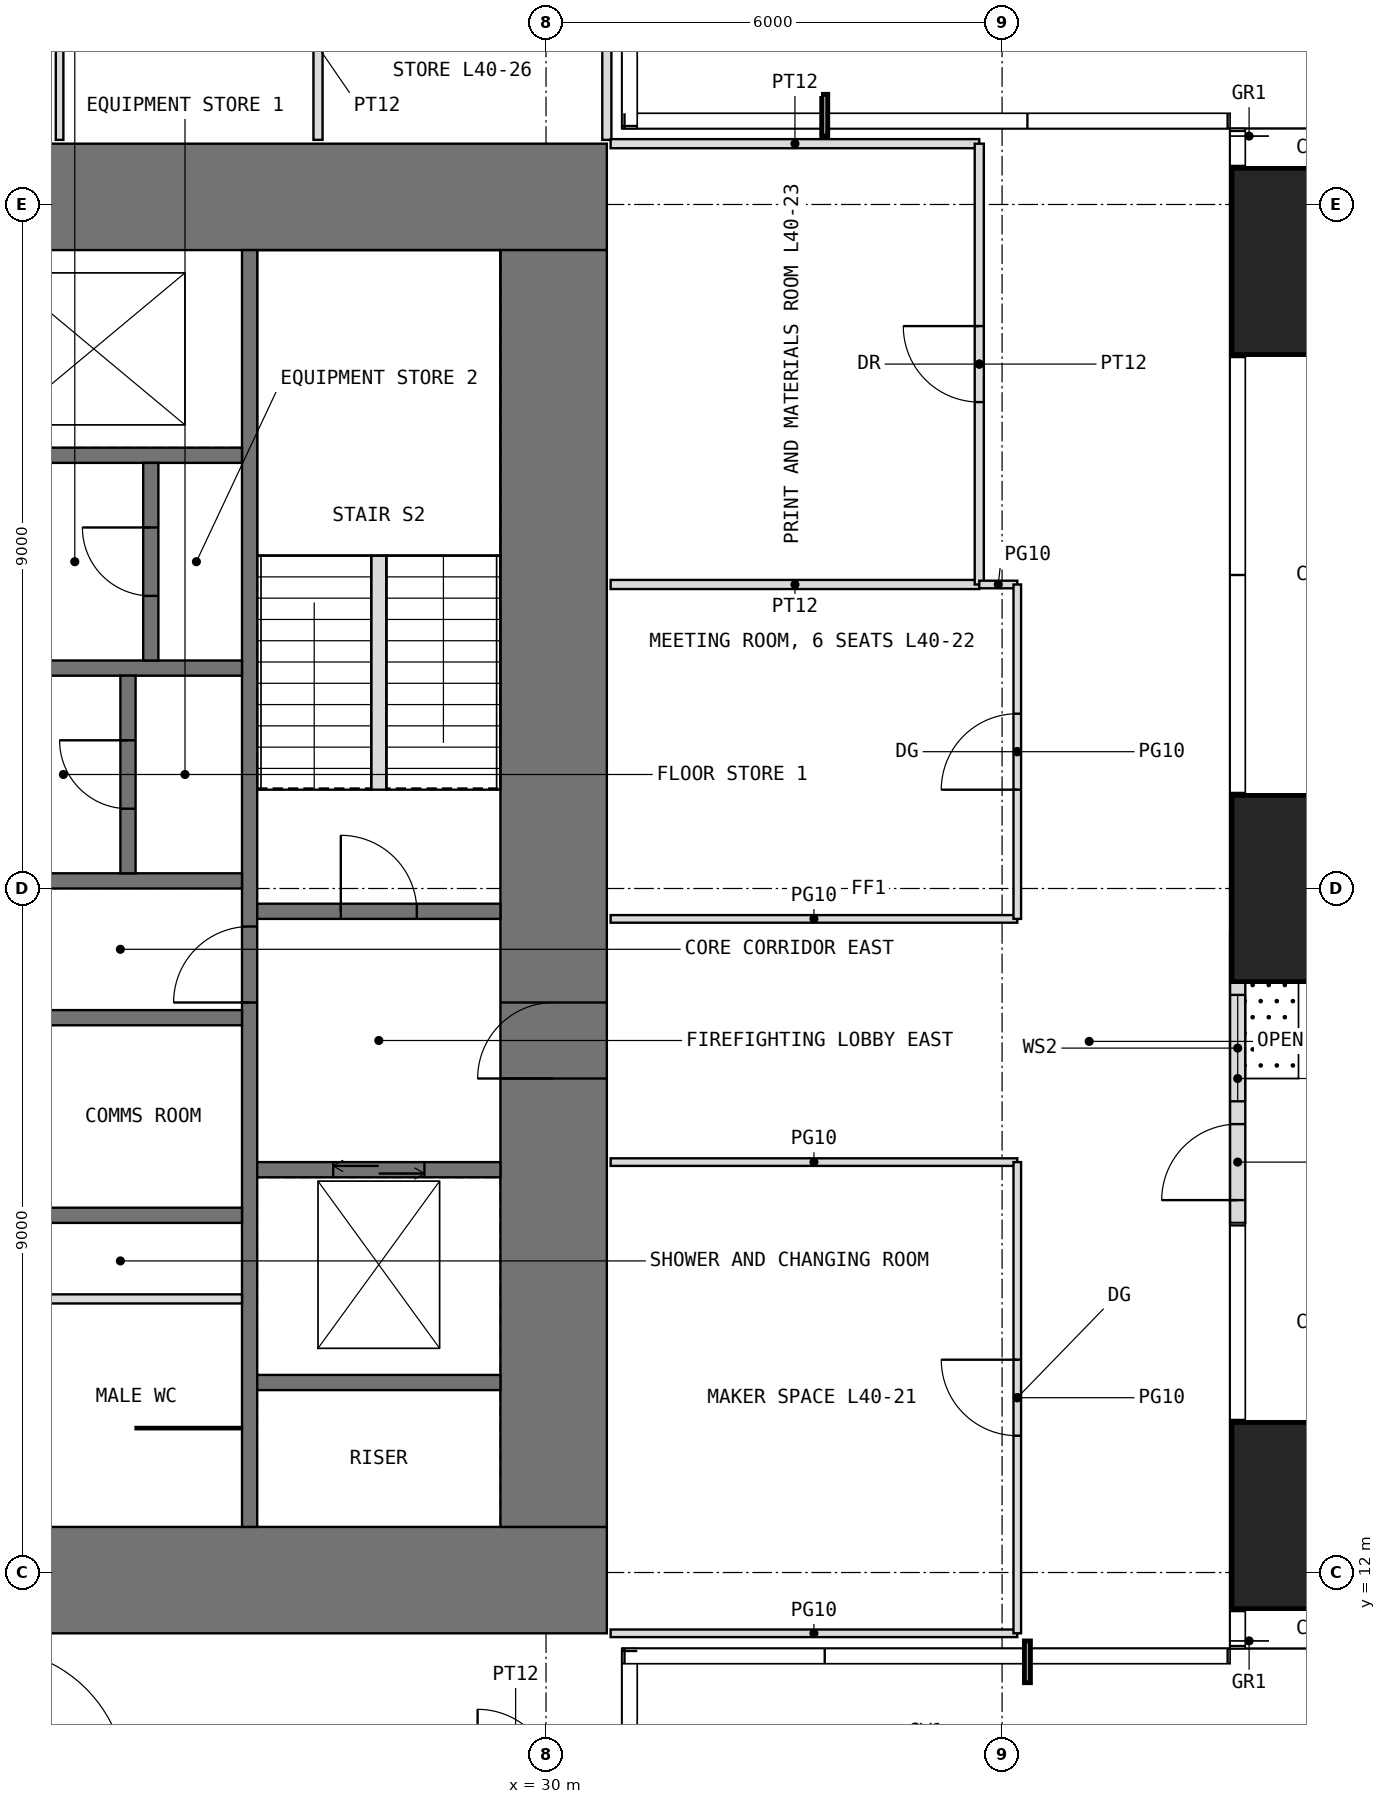
"""IFC4 building model, lengths in metres.
Left out: names, types, materials, properties, quantities, classifications, styles, units other than length and angle.
Written with IfcOpenShell. Run it as: python <this file> out.ifc"""

import sys

from ifc_helpers import new_model, si_unit, direction, frame, frame_2d, origin, origin_2d, place, context, subcontext, project, spatial, rectangle, extrude, element, fill, save


model = new_model("IFC4")
c1 = context("Model", 3, precision=1e-05, world=origin(), true_north=direction((0.0, 1.0)))
c2 = subcontext(c1, "Body", "Model", "MODEL_VIEW")
j1 = project(units=[si_unit("LENGTHUNIT", "METRE"), si_unit("PLANEANGLEUNIT", "RADIAN")], contexts=[c1])
p1 = place(None, origin())
s1 = spatial("IfcSite", under=j1, at=p1, CompositionType="ELEMENT")
p2 = place(p1, origin())
s2 = spatial("IfcBuilding", under=s1, at=p2, CompositionType="ELEMENT")
p3 = place(p2, frame((0.0, 0.0, 170.5)))
s3 = spatial("IfcBuildingStorey", under=s2, at=p3, CompositionType="ELEMENT", Elevation=170.5)
for number, where, z_axis, x_axis in (
    (1, (40.25, 12.75, 0.0), (0.0, 0.0, 1.0), (1.0, 0.0, 0.0)),
    (2, (40.25, 21.0, 0.0), (0.0, 0.0, 1.0), (1.0, 0.0, 0.0)),
    (3, (40.25, 29.25, 0.0), (0.0, 0.0, 1.0), (1.0, 0.0, 0.0)),
):
    element("IfcColumn", number, at=place(p3, frame(where, z_axis=z_axis, x_axis=x_axis)), inside=s3, PredefinedType="COLUMN", context=c2, shape_type="SweptSolid", body=[
        extrude(rectangle(XDim=2.45, YDim=2.45, at=origin_2d()), origin(), (0.0, 0.0, 1.0), 4.0),
    ])
p4 = place(p3, frame((39.1, 16.6, 0.0), z_axis=(0.0, 0.0, 1.0), x_axis=(0.0, 1.0, 0.0)))
e4 = element("IfcWall", 4, at=p4, inside=s3, PredefinedType="USERDEFINED", context=c2, shape_type="SweptSolid", body=[
    extrude(rectangle(XDim=3.8, YDim=0.2, at=frame_2d((1.9, 0.0))), origin(), (0.0, 0.0, 1.0), 3.75),
])
p5 = place(p4, frame((0.3, 0.0, 0.0)))
e5 = element("IfcOpeningElement", 5, at=p5, cuts=e4, PredefinedType="OPENING", context=c2, shape_type="SweptSolid", body=[
    extrude(rectangle(XDim=1.0, YDim=2.4, at=frame_2d((0.5, 1.2))), frame((0.0, 0.11, 0.0), z_axis=(0.0, -1.0, 0.0), x_axis=(1.0, 0.0, 0.0)), (0.0, 0.0, 1.0), 0.22),
])
p6 = place(p4, frame((1.6, 0.0, 0.3)))
e6 = element("IfcOpeningElement", 6, at=p6, cuts=e4, PredefinedType="OPENING", context=c2, shape_type="SweptSolid", body=[
    extrude(rectangle(XDim=1.4, YDim=2.7, at=frame_2d((0.7, 1.35))), frame((0.0, 0.11, 0.0), z_axis=(0.0, -1.0, 0.0), x_axis=(1.0, 0.0, 0.0)), (0.0, 0.0, 1.0), 0.22),
])
p7 = place(p3, frame((11.2, 11.9, -0.05), z_axis=(0.0, 0.0, 1.0), x_axis=(1.0, 0.0, 0.0)))
e7 = element("IfcWall", 7, at=p7, inside=s3, PredefinedType="SHEAR", context=c2, shape_type="SweptSolid", body=[
    extrude(rectangle(XDim=19.6, YDim=1.4, at=frame_2d((9.8, 0.0))), origin(), (0.0, 0.0, 1.0), 4.0),
])
p8 = place(p7, frame((8.8, 0.0, 0.05)))
e8 = element("IfcOpeningElement", 8, at=p8, cuts=e7, PredefinedType="OPENING", context=c2, shape_type="SweptSolid", body=[
    extrude(rectangle(XDim=2.0, YDim=2.2, at=frame_2d((1.0, 1.1))), frame((0.0, 0.71, 0.0), z_axis=(0.0, -1.0, 0.0), x_axis=(1.0, 0.0, 0.0)), (0.0, 0.0, 1.0), 1.42),
])
p9 = place(p3, frame((11.2, 30.1, -0.05), z_axis=(0.0, 0.0, 1.0), x_axis=(1.0, 0.0, 0.0)))
e9 = element("IfcWall", 9, at=p9, inside=s3, PredefinedType="SHEAR", context=c2, shape_type="SweptSolid", body=[
    extrude(rectangle(XDim=19.6, YDim=1.4, at=frame_2d((9.8, 0.0))), origin(), (0.0, 0.0, 1.0), 4.0),
])
p10 = place(p9, frame((8.8, 0.0, 0.05)))
e10 = element("IfcOpeningElement", 10, at=p10, cuts=e9, PredefinedType="OPENING", context=c2, shape_type="SweptSolid", body=[
    extrude(rectangle(XDim=2.0, YDim=2.2, at=frame_2d((1.0, 1.1))), frame((0.0, 0.71, 0.0), z_axis=(0.0, -1.0, 0.0), x_axis=(1.0, 0.0, 0.0)), (0.0, 0.0, 1.0), 1.42),
])
p11 = place(p3, frame((30.1, 12.6, -0.05), z_axis=(0.0, 0.0, 1.0), x_axis=(0.0, 1.0, 0.0)))
e11 = element("IfcWall", 11, at=p11, inside=s3, PredefinedType="SHEAR", context=c2, shape_type="SweptSolid", body=[
    extrude(rectangle(XDim=16.8, YDim=1.4, at=frame_2d((8.4, 0.0))), origin(), (0.0, 0.0, 1.0), 4.0),
])
p12 = place(p11, frame((5.9, 0.0, 0.05)))
e12 = element("IfcOpeningElement", 12, at=p12, cuts=e11, PredefinedType="OPENING", context=c2, shape_type="SweptSolid", body=[
    extrude(rectangle(XDim=1.0, YDim=2.2, at=frame_2d((0.5, 1.1))), frame((0.0, 0.71, 0.0), z_axis=(0.0, -1.0, 0.0), x_axis=(1.0, 0.0, 0.0)), (0.0, 0.0, 1.0), 1.42),
])
p13 = place(p3, frame((26.1, 12.6, -0.05), z_axis=(0.0, 0.0, 1.0), x_axis=(0.0, 1.0, 0.0)))
e13 = element("IfcWall", 13, at=p13, inside=s3, PredefinedType="SHEAR", context=c2, shape_type="SweptSolid", body=[
    extrude(rectangle(XDim=16.8, YDim=0.2, at=frame_2d((8.4, 0.0))), origin(), (0.0, 0.0, 1.0), 4.0),
])
p14 = place(p13, frame((6.9, 0.0, 0.05)))
e14 = element("IfcOpeningElement", 14, at=p14, cuts=e13, PredefinedType="OPENING", context=c2, shape_type="SweptSolid", body=[
    extrude(rectangle(XDim=1.0, YDim=2.2, at=frame_2d((0.5, 1.1))), frame((0.0, 0.11, 0.0), z_axis=(0.0, -1.0, 0.0), x_axis=(1.0, 0.0, 0.0)), (0.0, 0.0, 1.0), 0.22),
])
for number, where, z_axis, x_axis in (
    (15, (22.8, 16.7, -0.05), (0.0, 0.0, 1.0), (1.0, 0.0, 0.0)),
    (16, (22.8, 19.3, -0.05), (0.0, 0.0, 1.0), (1.0, 0.0, 0.0)),
    (17, (22.8, 21.1, -0.05), (0.0, 0.0, 1.0), (1.0, 0.0, 0.0)),
    (18, (22.8, 23.9, -0.05), (0.0, 0.0, 1.0), (1.0, 0.0, 0.0)),
    (19, (22.8, 26.7, -0.05), (0.0, 0.0, 1.0), (1.0, 0.0, 0.0)),
    (20, (26.2, 14.5, -0.05), (0.0, 0.0, 1.0), (1.0, 0.0, 0.0)),
):
    element("IfcWall", number, at=place(p3, frame(where, z_axis=z_axis, x_axis=x_axis)), inside=s3, PredefinedType="SHEAR", context=c2, shape_type="SweptSolid", body=[
        extrude(rectangle(XDim=3.2, YDim=0.2, at=frame_2d((1.6, 0.0))), origin(), (0.0, 0.0, 1.0), 4.0),
    ])
p15 = place(p3, frame((26.2, 17.3, -0.05), z_axis=(0.0, 0.0, 1.0), x_axis=(1.0, 0.0, 0.0)))
e21 = element("IfcWall", 21, at=p15, inside=s3, PredefinedType="SHEAR", context=c2, shape_type="SweptSolid", body=[
    extrude(rectangle(XDim=3.2, YDim=0.2, at=frame_2d((1.6, 0.0))), origin(), (0.0, 0.0, 1.0), 4.0),
])
p16 = place(p15, frame((1.0, 0.0, 0.05)))
e22 = element("IfcOpeningElement", 22, at=p16, cuts=e21, PredefinedType="OPENING", context=c2, shape_type="SweptSolid", body=[
    extrude(rectangle(XDim=1.2, YDim=2.2, at=frame_2d((0.6, 1.1))), frame((0.0, 0.11, 0.0), z_axis=(0.0, -1.0, 0.0), x_axis=(1.0, 0.0, 0.0)), (0.0, 0.0, 1.0), 0.22),
])
p17 = place(p3, frame((26.2, 20.7, -0.05), z_axis=(0.0, 0.0, 1.0), x_axis=(1.0, 0.0, 0.0)))
e23 = element("IfcWall", 23, at=p17, inside=s3, PredefinedType="SHEAR", context=c2, shape_type="SweptSolid", body=[
    extrude(rectangle(XDim=3.2, YDim=0.2, at=frame_2d((1.6, 0.0))), origin(), (0.0, 0.0, 1.0), 4.0),
])
p18 = place(p17, frame((1.1, 0.0, 0.05)))
e24 = element("IfcOpeningElement", 24, at=p18, cuts=e23, PredefinedType="OPENING", context=c2, shape_type="SweptSolid", body=[
    extrude(rectangle(XDim=1.0, YDim=2.2, at=frame_2d((0.5, 1.1))), frame((0.0, 0.11, 0.0), z_axis=(0.0, -1.0, 0.0), x_axis=(1.0, 0.0, 0.0)), (0.0, 0.0, 1.0), 0.22),
])
p19 = place(p3, frame((22.8, 15.6, 0.0), z_axis=(0.0, 0.0, 1.0), x_axis=(1.0, 0.0, 0.0)))
e25 = element("IfcWall", 25, at=p19, inside=s3, PredefinedType="PARTITIONING", context=c2, shape_type="SweptSolid", body=[
    extrude(rectangle(XDim=3.2, YDim=0.12, at=frame_2d((1.6, 0.0))), origin(), (0.0, 0.0, 1.0), 3.75),
])
p20 = place(p3, frame((24.6, 13.9, 0.0), z_axis=(0.0, 0.0, 1.0), x_axis=(1.0, 0.0, 0.0)))
e26 = element("IfcWall", 26, at=p20, inside=s3, PredefinedType="PARTITIONING", context=c2, shape_type="SweptSolid", body=[
    extrude(rectangle(XDim=1.4, YDim=0.03, at=frame_2d((0.7, 0.0))), origin(), (0.0, 0.0, 1.0), 3.75),
])
p21 = place(p3, frame((24.5, 21.2, -0.05), z_axis=(0.0, 0.0, 1.0), x_axis=(0.0, 1.0, 0.0)))
e27 = element("IfcWall", 27, at=p21, inside=s3, PredefinedType="SHEAR", context=c2, shape_type="SweptSolid", body=[
    extrude(rectangle(XDim=2.6, YDim=0.2, at=frame_2d((1.3, 0.0))), origin(), (0.0, 0.0, 1.0), 4.0),
])
p22 = place(p21, frame((0.85, 0.0, 0.05)))
e28 = element("IfcOpeningElement", 28, at=p22, cuts=e27, PredefinedType="OPENING", context=c2, shape_type="SweptSolid", body=[
    extrude(rectangle(XDim=0.9, YDim=2.2, at=frame_2d((0.45, 1.1))), frame((0.0, 0.11, 0.0), z_axis=(0.0, -1.0, 0.0), x_axis=(1.0, 0.0, 0.0)), (0.0, 0.0, 1.0), 0.22),
])
p23 = place(p3, frame((24.8, 24.0, -0.05), z_axis=(0.0, 0.0, 1.0), x_axis=(0.0, 1.0, 0.0)))
e29 = element("IfcWall", 29, at=p23, inside=s3, PredefinedType="SHEAR", context=c2, shape_type="SweptSolid", body=[
    extrude(rectangle(XDim=2.6, YDim=0.2, at=frame_2d((1.3, 0.0))), origin(), (0.0, 0.0, 1.0), 4.0),
])
p24 = place(p23, frame((0.85, 0.0, 0.05)))
e30 = element("IfcOpeningElement", 30, at=p24, cuts=e29, PredefinedType="OPENING", context=c2, shape_type="SweptSolid", body=[
    extrude(rectangle(XDim=0.9, YDim=2.2, at=frame_2d((0.45, 1.1))), frame((0.0, 0.11, 0.0), z_axis=(0.0, -1.0, 0.0), x_axis=(1.0, 0.0, 0.0)), (0.0, 0.0, 1.0), 0.22),
])
p25 = place(p3, frame((23.6, 30.85, 0.0), z_axis=(0.0, 0.0, 1.0), x_axis=(0.0, 1.0, 0.0)))
e31 = element("IfcWall", 31, at=p25, inside=s3, PredefinedType="PARTITIONING", context=c2, shape_type="SweptSolid", body=[
    extrude(rectangle(XDim=2.95, YDim=0.1, at=frame_2d((1.475, 0.0))), origin(), (0.0, 0.0, 1.0), 3.75),
])
for number, where, z_axis, x_axis in (
    (32, (27.0, 30.85, 0.0), (0.0, 0.0, 1.0), (0.0, 1.0, 0.0)),
    (33, (30.8, 30.85, 0.0), (0.0, 0.0, 1.0), (0.0, 1.0, 0.0)),
):
    element("IfcWall", number, at=place(p3, frame(where, z_axis=z_axis, x_axis=x_axis)), inside=s3, PredefinedType="PARTITIONING", context=c2, shape_type="SweptSolid", body=[
        extrude(rectangle(XDim=2.45, YDim=0.12, at=frame_2d((1.225, 0.0))), origin(), (0.0, 0.0, 1.0), 3.75),
    ])
for number, where, z_axis, x_axis in (
    (34, (30.85, 11.2, 0.0), (0.0, 0.0, 1.0), (1.0, 0.0, 0.0)),
    (35, (30.85, 17.4, 0.0), (0.0, 0.0, 1.0), (1.0, 0.0, 0.0)),
    (36, (30.85, 20.6, 0.0), (0.0, 0.0, 1.0), (1.0, 0.0, 0.0)),
):
    element("IfcWall", number, at=place(p3, frame(where, z_axis=z_axis, x_axis=x_axis)), inside=s3, PredefinedType="PARTITIONING", context=c2, shape_type="SweptSolid", body=[
        extrude(rectangle(XDim=5.35, YDim=0.1, at=frame_2d((2.675, 0.0))), origin(), (0.0, 0.0, 1.0), 3.75),
    ])
for number, where, z_axis, x_axis in (
    (37, (30.85, 25.0, 0.0), (0.0, 0.0, 1.0), (1.0, 0.0, 0.0)),
    (38, (30.85, 30.8, 0.0), (0.0, 0.0, 1.0), (1.0, 0.0, 0.0)),
):
    element("IfcWall", number, at=place(p3, frame(where, z_axis=z_axis, x_axis=x_axis)), inside=s3, PredefinedType="PARTITIONING", context=c2, shape_type="SweptSolid", body=[
        extrude(rectangle(XDim=4.85, YDim=0.12, at=frame_2d((2.425, 0.0))), origin(), (0.0, 0.0, 1.0), 3.75),
    ])
p26 = place(p3, frame((35.7, 25.0, 0.0), z_axis=(0.0, 0.0, 1.0), x_axis=(0.0, 1.0, 0.0)))
e39 = element("IfcWall", 39, at=p26, inside=s3, PredefinedType="PARTITIONING", context=c2, shape_type="SweptSolid", body=[
    extrude(rectangle(XDim=5.8, YDim=0.12, at=frame_2d((2.9, 0.0))), origin(), (0.0, 0.0, 1.0), 3.75),
])
p27 = place(p26, frame((2.4, 0.0, 0.0)))
e40 = element("IfcOpeningElement", 40, at=p27, cuts=e39, PredefinedType="OPENING", context=c2, shape_type="SweptSolid", body=[
    extrude(rectangle(XDim=1.0, YDim=2.2, at=frame_2d((0.5, 1.1))), frame((0.0, 0.07, 0.0), z_axis=(0.0, -1.0, 0.0), x_axis=(1.0, 0.0, 0.0)), (0.0, 0.0, 1.0), 0.14),
])
p28 = place(p3, frame((35.7, 25.0, 0.0), z_axis=(0.0, 0.0, 1.0), x_axis=(1.0, 0.0, 0.0)))
e41 = element("IfcWall", 41, at=p28, inside=s3, PredefinedType="PARTITIONING", context=c2, shape_type="SweptSolid", body=[
    extrude(rectangle(XDim=0.5, YDim=0.1, at=frame_2d((0.25, 0.0))), origin(), (0.0, 0.0, 1.0), 3.75),
])
p29 = place(p3, frame((36.2, 11.2, 0.0), z_axis=(0.0, 0.0, 1.0), x_axis=(0.0, 1.0, 0.0)))
e42 = element("IfcWall", 42, at=p29, inside=s3, PredefinedType="PARTITIONING", context=c2, shape_type="SweptSolid", body=[
    extrude(rectangle(XDim=6.2, YDim=0.1, at=frame_2d((3.1, 0.0))), origin(), (0.0, 0.0, 1.0), 3.75),
])
p30 = place(p29, frame((2.6, 0.0, 0.0)))
e43 = element("IfcOpeningElement", 43, at=p30, cuts=e42, PredefinedType="OPENING", context=c2, shape_type="SweptSolid", body=[
    extrude(rectangle(XDim=1.0, YDim=2.4, at=frame_2d((0.5, 1.2))), frame((0.0, 0.06, 0.0), z_axis=(0.0, -1.0, 0.0), x_axis=(1.0, 0.0, 0.0)), (0.0, 0.0, 1.0), 0.12),
])
p31 = place(p3, frame((36.2, 20.6, 0.0), z_axis=(0.0, 0.0, 1.0), x_axis=(0.0, 1.0, 0.0)))
e44 = element("IfcWall", 44, at=p31, inside=s3, PredefinedType="PARTITIONING", context=c2, shape_type="SweptSolid", body=[
    extrude(rectangle(XDim=4.4, YDim=0.1, at=frame_2d((2.2, 0.0))), origin(), (0.0, 0.0, 1.0), 3.75),
])
p32 = place(p31, frame((1.7, 0.0, 0.0)))
e45 = element("IfcOpeningElement", 45, at=p32, cuts=e44, PredefinedType="OPENING", context=c2, shape_type="SweptSolid", body=[
    extrude(rectangle(XDim=1.0, YDim=2.4, at=frame_2d((0.5, 1.2))), frame((0.0, 0.06, 0.0), z_axis=(0.0, -1.0, 0.0), x_axis=(1.0, 0.0, 0.0)), (0.0, 0.0, 1.0), 0.12),
])
p33 = place(p3, frame((27.8, 22.3, 0.0), z_axis=(0.0, 0.0, 1.0), x_axis=(0.0, 1.0, 0.0)))
e46 = element("IfcWall", 46, at=p33, inside=s3, PredefinedType="PARTITIONING", context=c2, shape_type="SweptSolid", body=[
    extrude(rectangle(XDim=3.08, YDim=0.2, at=frame_2d((1.54, 0.0))), origin(), (0.0, 0.0, 1.0), 4.0),
])
p34 = place(p5, origin())
e47 = element("IfcDoor", 47, at=p34, inside=s3, OperationType="SINGLE_SWING_LEFT", PredefinedType="DOOR", context=c2, shape_type="SweptSolid", body=[
    extrude(rectangle(XDim=1.0, YDim=2.4, at=frame_2d((0.5, 1.2))), frame((0.0, 0.025, 0.0), z_axis=(0.0, -1.0, 0.0), x_axis=(1.0, 0.0, 0.0)), (0.0, 0.0, 1.0), 0.05),
])
fill(e5, e47)
p35 = place(p6, origin())
e48 = element("IfcWindow", 48, at=p35, inside=s3, PartitioningType="SINGLE_PANEL", PredefinedType="WINDOW", context=c2, shape_type="SweptSolid", body=[
    extrude(rectangle(XDim=1.4, YDim=2.7, at=frame_2d((0.7, 1.35))), frame((0.0, 0.03, 0.0), z_axis=(0.0, -1.0, 0.0), x_axis=(1.0, 0.0, 0.0)), (0.0, 0.0, 1.0), 0.06),
])
fill(e6, e48)
p36 = place(p12, origin())
e49 = element("IfcDoor", 49, at=p36, inside=s3, OperationType="SINGLE_SWING_LEFT", PredefinedType="DOOR", context=c2, shape_type="SweptSolid", body=[
    extrude(rectangle(XDim=1.0, YDim=2.2, at=frame_2d((0.5, 1.1))), frame((0.0, 0.025, 0.0), z_axis=(0.0, -1.0, 0.0), x_axis=(1.0, 0.0, 0.0)), (0.0, 0.0, 1.0), 0.05),
])
fill(e12, e49)
p37 = place(p18, origin())
e50 = element("IfcDoor", 50, at=p37, inside=s3, OperationType="SINGLE_SWING_LEFT", PredefinedType="DOOR", context=c2, shape_type="SweptSolid", body=[
    extrude(rectangle(XDim=1.0, YDim=2.2, at=frame_2d((0.5, 1.1))), frame((0.0, 0.025, 0.0), z_axis=(0.0, -1.0, 0.0), x_axis=(1.0, 0.0, 0.0)), (0.0, 0.0, 1.0), 0.05),
])
fill(e24, e50)
p38 = place(p14, origin())
e51 = element("IfcDoor", 51, at=p38, inside=s3, OperationType="SINGLE_SWING_LEFT", PredefinedType="DOOR", context=c2, shape_type="SweptSolid", body=[
    extrude(rectangle(XDim=1.0, YDim=2.2, at=frame_2d((0.5, 1.1))), frame((0.0, 0.025, 0.0), z_axis=(0.0, -1.0, 0.0), x_axis=(1.0, 0.0, 0.0)), (0.0, 0.0, 1.0), 0.05),
])
fill(e14, e51)
p39 = place(p22, origin())
e52 = element("IfcDoor", 52, at=p39, inside=s3, OperationType="SINGLE_SWING_RIGHT", PredefinedType="DOOR", context=c2, shape_type="SweptSolid", body=[
    extrude(rectangle(XDim=0.9, YDim=2.2, at=frame_2d((0.45, 1.1))), frame((0.0, 0.025, 0.0), z_axis=(0.0, -1.0, 0.0), x_axis=(1.0, 0.0, 0.0)), (0.0, 0.0, 1.0), 0.05),
])
fill(e28, e52)
p40 = place(p24, origin())
e53 = element("IfcDoor", 53, at=p40, inside=s3, OperationType="SINGLE_SWING_RIGHT", PredefinedType="DOOR", context=c2, shape_type="SweptSolid", body=[
    extrude(rectangle(XDim=0.9, YDim=2.2, at=frame_2d((0.45, 1.1))), frame((0.0, 0.025, 0.0), z_axis=(0.0, -1.0, 0.0), x_axis=(1.0, 0.0, 0.0)), (0.0, 0.0, 1.0), 0.05),
])
fill(e30, e53)
p41 = place(p30, origin())
e54 = element("IfcDoor", 54, at=p41, inside=s3, OperationType="SINGLE_SWING_RIGHT", PredefinedType="DOOR", context=c2, shape_type="SweptSolid", body=[
    extrude(rectangle(XDim=1.0, YDim=2.4, at=frame_2d((0.5, 1.2))), frame((0.0, 0.025, 0.0), z_axis=(0.0, -1.0, 0.0), x_axis=(1.0, 0.0, 0.0)), (0.0, 0.0, 1.0), 0.05),
])
fill(e43, e54)
p42 = place(p32, origin())
e55 = element("IfcDoor", 55, at=p42, inside=s3, OperationType="SINGLE_SWING_LEFT", PredefinedType="DOOR", context=c2, shape_type="SweptSolid", body=[
    extrude(rectangle(XDim=1.0, YDim=2.4, at=frame_2d((0.5, 1.2))), frame((0.0, 0.025, 0.0), z_axis=(0.0, -1.0, 0.0), x_axis=(1.0, 0.0, 0.0)), (0.0, 0.0, 1.0), 0.05),
])
fill(e45, e55)
p43 = place(p27, origin())
e56 = element("IfcDoor", 56, at=p43, inside=s3, OperationType="SINGLE_SWING_RIGHT", PredefinedType="DOOR", context=c2, shape_type="SweptSolid", body=[
    extrude(rectangle(XDim=1.0, YDim=2.2, at=frame_2d((0.5, 1.1))), frame((0.0, 0.025, 0.0), z_axis=(0.0, -1.0, 0.0), x_axis=(1.0, 0.0, 0.0)), (0.0, 0.0, 1.0), 0.05),
])
fill(e40, e56)
p44 = place(p16, origin())
e57 = element("IfcDoor", 57, at=p44, inside=s3, OperationType="DOUBLE_DOOR_SLIDING", PredefinedType="DOOR", context=c2, shape_type="SweptSolid", body=[
    extrude(rectangle(XDim=1.2, YDim=2.2, at=frame_2d((0.6, 1.1))), frame((0.0, 0.025, 0.0), z_axis=(0.0, -1.0, 0.0), x_axis=(1.0, 0.0, 0.0)), (0.0, 0.0, 1.0), 0.05),
])
fill(e22, e57)
save(model, sys.argv[1])
